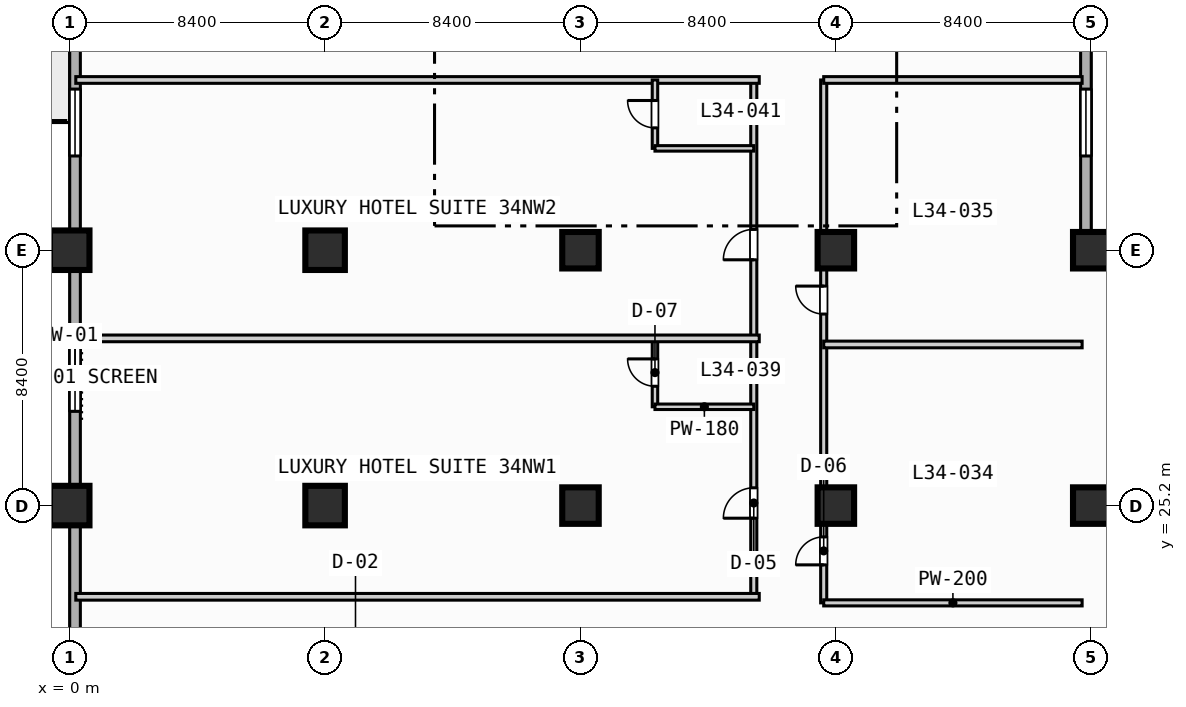
"""IFC4 building model, lengths in metres.
Left out: names, types, materials, properties, quantities, classifications, styles, units other than length and angle.
Written with IfcOpenShell. Run it as: python <this file> out.ifc"""

import sys

from ifc_helpers import new_model, si_unit, direction, frame, frame_2d, origin, origin_2d, place, context, subcontext, project, spatial, rectangle, extrude, element, fill, save


model = new_model("IFC4")
c1 = context("Model", 3, precision=1e-05, world=origin(), true_north=direction((0.0, 1.0)))
c2 = subcontext(c1, "Body", "Model", "MODEL_VIEW")
j1 = project(units=[si_unit("LENGTHUNIT", "METRE"), si_unit("PLANEANGLEUNIT", "RADIAN")], contexts=[c1])
p1 = place(None, origin())
s1 = spatial("IfcSite", under=j1, at=p1, CompositionType="ELEMENT")
p2 = place(p1, origin())
s2 = spatial("IfcBuilding", under=s1, at=p2, CompositionType="ELEMENT")
p3 = place(p2, frame((0.0, 0.0, 141.8)))
s3 = spatial("IfcBuildingStorey", under=s2, at=p3, CompositionType="ELEMENT", Elevation=141.8)
for number, where, z_axis, x_axis in (
    (1, (0.0, 25.2, 0.0), (0.0, 0.0, 1.0), (1.0, 0.0, 0.0)),
    (2, (0.0, 33.6, 0.0), (0.0, 0.0, 1.0), (1.0, 0.0, 0.0)),
    (3, (8.4, 25.2, 0.0), (0.0, 0.0, 1.0), (1.0, 0.0, 0.0)),
    (4, (8.4, 33.6, 0.0), (0.0, 0.0, 1.0), (1.0, 0.0, 0.0)),
):
    element("IfcColumn", number, at=place(p3, frame(where, z_axis=z_axis, x_axis=x_axis)), inside=s3, PredefinedType="COLUMN", context=c2, shape_type="SweptSolid", body=[
        extrude(rectangle(XDim=1.3, YDim=1.3, at=origin_2d()), origin(), (0.0, 0.0, 1.0), 3.8),
    ])
for number, where, z_axis, x_axis in (
    (5, (16.8, 25.2, 0.0), (0.0, 0.0, 1.0), (1.0, 0.0, 0.0)),
    (6, (16.8, 33.6, 0.0), (0.0, 0.0, 1.0), (1.0, 0.0, 0.0)),
    (7, (25.2, 25.2, 0.0), (0.0, 0.0, 1.0), (1.0, 0.0, 0.0)),
    (8, (25.2, 33.6, 0.0), (0.0, 0.0, 1.0), (1.0, 0.0, 0.0)),
    (9, (33.6, 25.2, 0.0), (0.0, 0.0, 1.0), (1.0, 0.0, 0.0)),
    (10, (33.6, 33.6, 0.0), (0.0, 0.0, 1.0), (1.0, 0.0, 0.0)),
):
    element("IfcColumn", number, at=place(p3, frame(where, z_axis=z_axis, x_axis=x_axis)), inside=s3, PredefinedType="COLUMN", context=c2, shape_type="SweptSolid", body=[
        extrude(rectangle(XDim=1.2, YDim=1.2, at=origin_2d()), origin(), (0.0, 0.0, 1.0), 3.8),
    ])
p4 = place(p3, frame((0.175, 3.175, 0.0), z_axis=(0.0, 0.0, 1.0), x_axis=(0.0, 1.0, 0.0)))
e11 = element("IfcWall", 11, at=p4, inside=s3, PredefinedType="STANDARD", context=c2, shape_type="SweptSolid", body=[
    extrude(rectangle(XDim=86.05, YDim=0.35, at=frame_2d((43.025, 0.0))), origin(), (0.0, 0.0, 1.0), 3.55),
])
p5 = place(p4, frame((42.325, 0.0, 0.0)))
e12 = element("IfcOpeningElement", 12, at=p5, cuts=e11, PredefinedType="OPENING", context=c2, shape_type="SweptSolid", body=[
    extrude(rectangle(XDim=1.4, YDim=2.2, at=frame_2d((0.7, 1.1))), frame((0.0, 0.185, 0.0), z_axis=(0.0, -1.0, 0.0), x_axis=(1.0, 0.0, 0.0)), (0.0, 0.0, 1.0), 0.37),
])
p6 = place(p4, frame((25.125, 0.0, 0.85)))
e13 = element("IfcOpeningElement", 13, at=p6, cuts=e11, PredefinedType="OPENING", context=c2, shape_type="SweptSolid", body=[
    extrude(rectangle(XDim=2.2, YDim=1.8, at=frame_2d((1.1, 0.9))), frame((0.0, 0.185, 0.0), z_axis=(0.0, -1.0, 0.0), x_axis=(1.0, 0.0, 0.0)), (0.0, 0.0, 1.0), 0.37),
])
p7 = place(p4, frame((33.525, 0.0, 0.85)))
e14 = element("IfcOpeningElement", 14, at=p7, cuts=e11, PredefinedType="OPENING", context=c2, shape_type="SweptSolid", body=[
    extrude(rectangle(XDim=2.2, YDim=1.8, at=frame_2d((1.1, 0.9))), frame((0.0, 0.185, 0.0), z_axis=(0.0, -1.0, 0.0), x_axis=(1.0, 0.0, 0.0)), (0.0, 0.0, 1.0), 0.37),
])
p8 = place(p3, frame((33.425, 89.225, 0.0), z_axis=(0.0, 0.0, 1.0), x_axis=(0.0, -1.0, 0.0)))
e15 = element("IfcWall", 15, at=p8, inside=s3, PredefinedType="STANDARD", context=c2, shape_type="SweptSolid", body=[
    extrude(rectangle(XDim=55.8, YDim=0.35, at=frame_2d((27.9, 0.0))), origin(), (0.0, 0.0, 1.0), 3.55),
])
p9 = place(p8, frame((50.325, 0.0, 0.85)))
e16 = element("IfcOpeningElement", 16, at=p9, cuts=e15, PredefinedType="OPENING", context=c2, shape_type="SweptSolid", body=[
    extrude(rectangle(XDim=2.2, YDim=1.8, at=frame_2d((1.1, 0.9))), frame((0.0, 0.185, 0.0), z_axis=(0.0, -1.0, 0.0), x_axis=(1.0, 0.0, 0.0)), (0.0, 0.0, 1.0), 0.37),
])
p10 = place(p8, frame((33.525, 0.0, 0.85)))
e17 = element("IfcOpeningElement", 17, at=p10, cuts=e15, PredefinedType="OPENING", context=c2, shape_type="SweptSolid", body=[
    extrude(rectangle(XDim=2.2, YDim=1.8, at=frame_2d((1.1, 0.9))), frame((0.0, 0.185, 0.0), z_axis=(0.0, -1.0, 0.0), x_axis=(1.0, 0.0, 0.0)), (0.0, 0.0, 1.0), 0.37),
])
p11 = place(p8, frame((25.125, 0.0, 0.85)))
e18 = element("IfcOpeningElement", 18, at=p11, cuts=e15, PredefinedType="OPENING", context=c2, shape_type="SweptSolid", body=[
    extrude(rectangle(XDim=2.2, YDim=1.8, at=frame_2d((1.1, 0.9))), frame((0.0, 0.185, 0.0), z_axis=(0.0, -1.0, 0.0), x_axis=(1.0, 0.0, 0.0)), (0.0, 0.0, 1.0), 0.37),
])
p12 = place(p8, frame((16.725, 0.0, 0.85)))
e19 = element("IfcOpeningElement", 19, at=p12, cuts=e15, PredefinedType="OPENING", context=c2, shape_type="SweptSolid", body=[
    extrude(rectangle(XDim=2.2, YDim=1.8, at=frame_2d((1.1, 0.9))), frame((0.0, 0.185, 0.0), z_axis=(0.0, -1.0, 0.0), x_axis=(1.0, 0.0, 0.0)), (0.0, 0.0, 1.0), 0.37),
])
p13 = place(p8, frame((8.325, 0.0, 0.85)))
e20 = element("IfcOpeningElement", 20, at=p13, cuts=e15, PredefinedType="OPENING", context=c2, shape_type="SweptSolid", body=[
    extrude(rectangle(XDim=2.2, YDim=1.8, at=frame_2d((1.1, 0.9))), frame((0.0, 0.185, 0.0), z_axis=(0.0, -1.0, 0.0), x_axis=(1.0, 0.0, 0.0)), (0.0, 0.0, 1.0), 0.37),
])
p14 = place(p3, frame((33.425, 33.425, 0.0), z_axis=(0.0, 0.0, 1.0), x_axis=(1.0, 0.0, 0.0)))
e21 = element("IfcWall", 21, at=p14, inside=s3, PredefinedType="STANDARD", context=c2, shape_type="SweptSolid", body=[
    extrude(rectangle(XDim=39.0, YDim=0.35, at=frame_2d((19.5, 0.0))), origin(), (0.0, 0.0, 1.0), 3.55),
])
p15 = place(p14, frame((12.075, 0.0, 0.0)))
e22 = element("IfcOpeningElement", 22, at=p15, cuts=e21, PredefinedType="OPENING", context=c2, shape_type="SweptSolid", body=[
    extrude(rectangle(XDim=1.4, YDim=2.2, at=frame_2d((0.7, 1.1))), frame((0.0, 0.185, 0.0), z_axis=(0.0, -1.0, 0.0), x_axis=(1.0, 0.0, 0.0)), (0.0, 0.0, 1.0), 0.37),
])
p16 = place(p3, frame((24.8, 22.0, 0.0), z_axis=(0.0, 0.0, 1.0), x_axis=(0.0, 1.0, 0.0)))
e23 = element("IfcWall", 23, at=p16, inside=s3, PredefinedType="PARTITIONING", context=c2, shape_type="SweptSolid", body=[
    extrude(rectangle(XDim=17.2, YDim=0.2, at=frame_2d((8.6, 0.0))), origin(), (0.0, 0.0, 1.0), 3.55),
])
p17 = place(p16, frame((1.25, 0.0, 0.0)))
e24 = element("IfcOpeningElement", 24, at=p17, cuts=e23, PredefinedType="OPENING", context=c2, shape_type="SweptSolid", body=[
    extrude(rectangle(XDim=0.92, YDim=2.1, at=frame_2d((0.46, 1.05))), frame((0.0, 0.11, 0.0), z_axis=(0.0, -1.0, 0.0), x_axis=(1.0, 0.0, 0.0)), (0.0, 0.0, 1.0), 0.22),
])
p18 = place(p16, frame((9.5, 0.0, 0.0)))
e25 = element("IfcOpeningElement", 25, at=p18, cuts=e23, PredefinedType="OPENING", context=c2, shape_type="SweptSolid", body=[
    extrude(rectangle(XDim=0.92, YDim=2.1, at=frame_2d((0.46, 1.05))), frame((0.0, 0.11, 0.0), z_axis=(0.0, -1.0, 0.0), x_axis=(1.0, 0.0, 0.0)), (0.0, 0.0, 1.0), 0.22),
])
p19 = place(p3, frame((24.8, 22.0, 0.0), z_axis=(0.0, 0.0, 1.0), x_axis=(1.0, 0.0, 0.0)))
e26 = element("IfcWall", 26, at=p19, inside=s3, PredefinedType="PARTITIONING", context=c2, shape_type="SweptSolid", body=[
    extrude(rectangle(XDim=8.5, YDim=0.2, at=frame_2d((4.25, 0.0))), origin(), (0.0, 0.0, 1.0), 3.55),
])
for number, where, z_axis, x_axis in (
    (27, (24.8, 30.5, 0.0), (0.0, 0.0, 1.0), (1.0, 0.0, 0.0)),
    (28, (24.8, 39.2, 0.0), (0.0, 0.0, 1.0), (1.0, 0.0, 0.0)),
):
    element("IfcWall", number, at=place(p3, frame(where, z_axis=z_axis, x_axis=x_axis)), inside=s3, PredefinedType="PARTITIONING", context=c2, shape_type="SweptSolid", body=[
        extrude(rectangle(XDim=8.5, YDim=0.22, at=frame_2d((4.25, 0.0))), origin(), (0.0, 0.0, 1.0), 3.55),
    ])
p20 = place(p3, frame((22.5, 22.2, 0.0), z_axis=(0.0, 0.0, 1.0), x_axis=(0.0, 1.0, 0.0)))
e29 = element("IfcWall", 29, at=p20, inside=s3, PredefinedType="PARTITIONING", context=c2, shape_type="SweptSolid", body=[
    extrude(rectangle(XDim=17.0, YDim=0.2, at=frame_2d((8.5, 0.0))), origin(), (0.0, 0.0, 1.0), 3.55),
])
p21 = place(p20, frame((2.585, 0.0, 0.0)))
e30 = element("IfcOpeningElement", 30, at=p21, cuts=e29, PredefinedType="OPENING", context=c2, shape_type="SweptSolid", body=[
    extrude(rectangle(XDim=1.0, YDim=2.15, at=frame_2d((0.5, 1.075))), frame((0.0, 0.11, 0.0), z_axis=(0.0, -1.0, 0.0), x_axis=(1.0, 0.0, 0.0)), (0.0, 0.0, 1.0), 0.22),
])
p22 = place(p20, frame((11.085, 0.0, 0.0)))
e31 = element("IfcOpeningElement", 31, at=p22, cuts=e29, PredefinedType="OPENING", context=c2, shape_type="SweptSolid", body=[
    extrude(rectangle(XDim=1.0, YDim=2.15, at=frame_2d((0.5, 1.075))), frame((0.0, 0.11, 0.0), z_axis=(0.0, -1.0, 0.0), x_axis=(1.0, 0.0, 0.0)), (0.0, 0.0, 1.0), 0.22),
])
p23 = place(p3, frame((0.2, 22.2, 0.0), z_axis=(0.0, 0.0, 1.0), x_axis=(1.0, 0.0, 0.0)))
e32 = element("IfcWall", 32, at=p23, inside=s3, PredefinedType="PARTITIONING", context=c2, shape_type="SweptSolid", body=[
    extrude(rectangle(XDim=22.48, YDim=0.22, at=frame_2d((11.24, 0.0))), origin(), (0.0, 0.0, 1.0), 3.55),
])
p24 = place(p3, frame((19.25, 28.45, 0.0), z_axis=(0.0, 0.0, 1.0), x_axis=(0.0, 1.0, 0.0)))
e33 = element("IfcWall", 33, at=p24, inside=s3, PredefinedType="PLUMBINGWALL", context=c2, shape_type="SweptSolid", body=[
    extrude(rectangle(XDim=2.25, YDim=0.18, at=frame_2d((1.125, 0.0))), origin(), (0.0, 0.0, 1.0), 3.55),
])
p25 = place(p24, frame((0.675, 0.0, 0.0)))
e34 = element("IfcOpeningElement", 34, at=p25, cuts=e33, PredefinedType="OPENING", context=c2, shape_type="SweptSolid", body=[
    extrude(rectangle(XDim=0.9, YDim=2.1, at=frame_2d((0.45, 1.05))), frame((0.0, 0.1, 0.0), z_axis=(0.0, -1.0, 0.0), x_axis=(1.0, 0.0, 0.0)), (0.0, 0.0, 1.0), 0.2),
])
p26 = place(p3, frame((19.25, 28.45, 0.0), z_axis=(0.0, 0.0, 1.0), x_axis=(1.0, 0.0, 0.0)))
e35 = element("IfcWall", 35, at=p26, inside=s3, PredefinedType="PLUMBINGWALL", context=c2, shape_type="SweptSolid", body=[
    extrude(rectangle(XDim=3.25, YDim=0.18, at=frame_2d((1.625, 0.0))), origin(), (0.0, 0.0, 1.0), 3.55),
])
for number, where, z_axis, x_axis in (
    (36, (0.2, 30.7, 0.0), (0.0, 0.0, 1.0), (1.0, 0.0, 0.0)),
    (37, (0.2, 39.2, 0.0), (0.0, 0.0, 1.0), (1.0, 0.0, 0.0)),
):
    element("IfcWall", number, at=place(p3, frame(where, z_axis=z_axis, x_axis=x_axis)), inside=s3, PredefinedType="PARTITIONING", context=c2, shape_type="SweptSolid", body=[
        extrude(rectangle(XDim=22.48, YDim=0.22, at=frame_2d((11.24, 0.0))), origin(), (0.0, 0.0, 1.0), 3.55),
    ])
p27 = place(p3, frame((19.25, 36.95, 0.0), z_axis=(0.0, 0.0, 1.0), x_axis=(0.0, 1.0, 0.0)))
e38 = element("IfcWall", 38, at=p27, inside=s3, PredefinedType="PLUMBINGWALL", context=c2, shape_type="SweptSolid", body=[
    extrude(rectangle(XDim=2.25, YDim=0.18, at=frame_2d((1.125, 0.0))), origin(), (0.0, 0.0, 1.0), 3.55),
])
p28 = place(p27, frame((0.675, 0.0, 0.0)))
e39 = element("IfcOpeningElement", 39, at=p28, cuts=e38, PredefinedType="OPENING", context=c2, shape_type="SweptSolid", body=[
    extrude(rectangle(XDim=0.9, YDim=2.1, at=frame_2d((0.45, 1.05))), frame((0.0, 0.1, 0.0), z_axis=(0.0, -1.0, 0.0), x_axis=(1.0, 0.0, 0.0)), (0.0, 0.0, 1.0), 0.2),
])
p29 = place(p3, frame((19.25, 36.95, 0.0), z_axis=(0.0, 0.0, 1.0), x_axis=(1.0, 0.0, 0.0)))
e40 = element("IfcWall", 40, at=p29, inside=s3, PredefinedType="PLUMBINGWALL", context=c2, shape_type="SweptSolid", body=[
    extrude(rectangle(XDim=3.25, YDim=0.18, at=frame_2d((1.625, 0.0))), origin(), (0.0, 0.0, 1.0), 3.55),
])
p30 = place(p6, origin())
e41 = element("IfcWindow", 41, at=p30, inside=s3, PartitioningType="SINGLE_PANEL", PredefinedType="WINDOW", context=c2, shape_type="SweptSolid", body=[
    extrude(rectangle(XDim=2.2, YDim=1.8, at=frame_2d((1.1, 0.9))), frame((0.0, 0.03, 0.0), z_axis=(0.0, -1.0, 0.0), x_axis=(1.0, 0.0, 0.0)), (0.0, 0.0, 1.0), 0.06),
])
fill(e13, e41)
p31 = place(p7, origin())
e42 = element("IfcWindow", 42, at=p31, inside=s3, PartitioningType="SINGLE_PANEL", PredefinedType="WINDOW", context=c2, shape_type="SweptSolid", body=[
    extrude(rectangle(XDim=2.2, YDim=1.8, at=frame_2d((1.1, 0.9))), frame((0.0, 0.03, 0.0), z_axis=(0.0, -1.0, 0.0), x_axis=(1.0, 0.0, 0.0)), (0.0, 0.0, 1.0), 0.06),
])
fill(e14, e42)
p32 = place(p9, origin())
e43 = element("IfcWindow", 43, at=p32, inside=s3, PartitioningType="SINGLE_PANEL", PredefinedType="WINDOW", context=c2, shape_type="SweptSolid", body=[
    extrude(rectangle(XDim=2.2, YDim=1.8, at=frame_2d((1.1, 0.9))), frame((0.0, 0.03, 0.0), z_axis=(0.0, -1.0, 0.0), x_axis=(1.0, 0.0, 0.0)), (0.0, 0.0, 1.0), 0.06),
])
fill(e16, e43)
p33 = place(p17, origin())
e44 = element("IfcDoor", 44, at=p33, inside=s3, OperationType="SINGLE_SWING_LEFT", PredefinedType="DOOR", context=c2, shape_type="SweptSolid", body=[
    extrude(rectangle(XDim=0.92, YDim=2.1, at=frame_2d((0.46, 1.05))), frame((0.0, 0.025, 0.0), z_axis=(0.0, -1.0, 0.0), x_axis=(1.0, 0.0, 0.0)), (0.0, 0.0, 1.0), 0.05),
])
fill(e24, e44)
p34 = place(p18, origin())
e45 = element("IfcDoor", 45, at=p34, inside=s3, OperationType="SINGLE_SWING_RIGHT", PredefinedType="DOOR", context=c2, shape_type="SweptSolid", body=[
    extrude(rectangle(XDim=0.92, YDim=2.1, at=frame_2d((0.46, 1.05))), frame((0.0, 0.025, 0.0), z_axis=(0.0, -1.0, 0.0), x_axis=(1.0, 0.0, 0.0)), (0.0, 0.0, 1.0), 0.05),
])
fill(e25, e45)
p35 = place(p21, origin())
e46 = element("IfcDoor", 46, at=p35, inside=s3, OperationType="SINGLE_SWING_LEFT", PredefinedType="DOOR", context=c2, shape_type="SweptSolid", body=[
    extrude(rectangle(XDim=1.0, YDim=2.15, at=frame_2d((0.5, 1.075))), frame((0.0, 0.025, 0.0), z_axis=(0.0, -1.0, 0.0), x_axis=(1.0, 0.0, 0.0)), (0.0, 0.0, 1.0), 0.05),
])
fill(e30, e46)
p36 = place(p22, origin())
e47 = element("IfcDoor", 47, at=p36, inside=s3, OperationType="SINGLE_SWING_LEFT", PredefinedType="DOOR", context=c2, shape_type="SweptSolid", body=[
    extrude(rectangle(XDim=1.0, YDim=2.15, at=frame_2d((0.5, 1.075))), frame((0.0, 0.025, 0.0), z_axis=(0.0, -1.0, 0.0), x_axis=(1.0, 0.0, 0.0)), (0.0, 0.0, 1.0), 0.05),
])
fill(e31, e47)
p37 = place(p25, origin())
e48 = element("IfcDoor", 48, at=p37, inside=s3, OperationType="SINGLE_SWING_RIGHT", PredefinedType="DOOR", context=c2, shape_type="SweptSolid", body=[
    extrude(rectangle(XDim=0.9, YDim=2.1, at=frame_2d((0.45, 1.05))), frame((0.0, 0.025, 0.0), z_axis=(0.0, -1.0, 0.0), x_axis=(1.0, 0.0, 0.0)), (0.0, 0.0, 1.0), 0.05),
])
fill(e34, e48)
p38 = place(p28, origin())
e49 = element("IfcDoor", 49, at=p38, inside=s3, OperationType="SINGLE_SWING_RIGHT", PredefinedType="DOOR", context=c2, shape_type="SweptSolid", body=[
    extrude(rectangle(XDim=0.9, YDim=2.1, at=frame_2d((0.45, 1.05))), frame((0.0, 0.025, 0.0), z_axis=(0.0, -1.0, 0.0), x_axis=(1.0, 0.0, 0.0)), (0.0, 0.0, 1.0), 0.05),
])
fill(e39, e49)
save(model, sys.argv[1])
